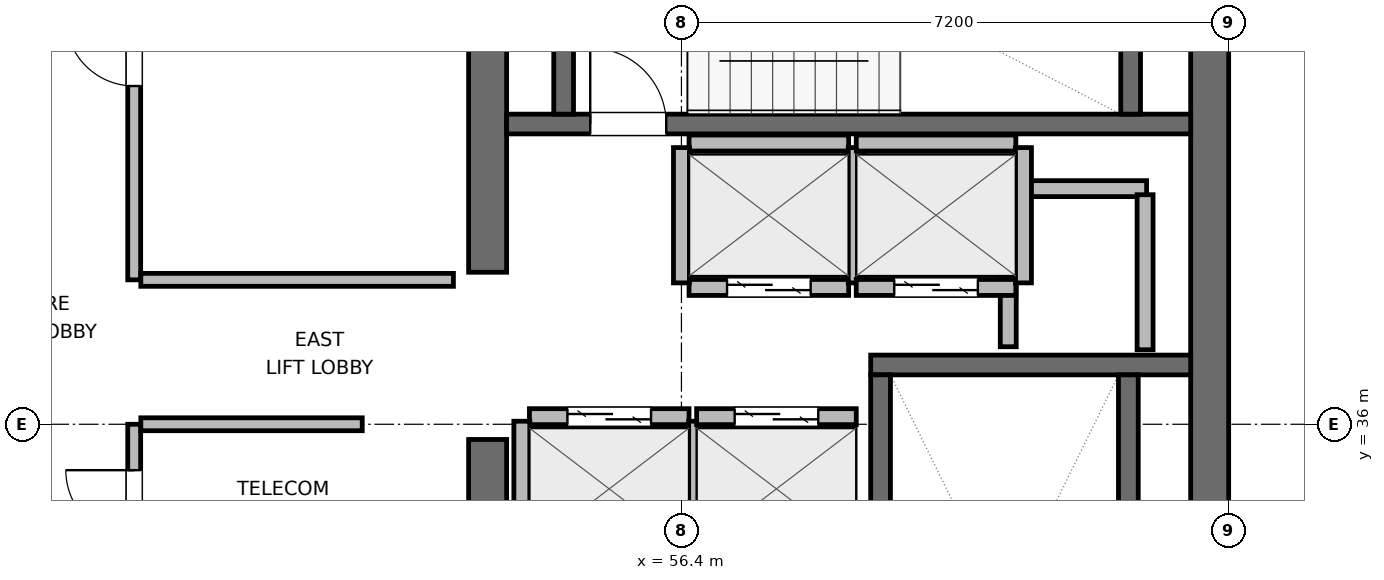
"""IFC4 building model, lengths in metres.
Left out: names, types, materials, properties, quantities, classifications, styles, units other than length and angle.
Written with IfcOpenShell. Run it as: python <this file> out.ifc"""

import sys

from ifc_helpers import new_model, si_unit, direction, frame, frame_2d, origin, place, context, subcontext, project, spatial, rectangle, extrude, element, fill, save


model = new_model("IFC4")
c1 = context("Model", 3, precision=1e-05, world=origin(), true_north=direction((0.0, 1.0)))
c2 = subcontext(c1, "Body", "Model", "MODEL_VIEW")
j1 = project(units=[si_unit("LENGTHUNIT", "METRE"), si_unit("PLANEANGLEUNIT", "RADIAN")], contexts=[c1])
p1 = place(None, origin())
s1 = spatial("IfcSite", under=j1, at=p1, CompositionType="ELEMENT")
p2 = place(p1, origin())
s2 = spatial("IfcBuilding", under=s1, at=p2, CompositionType="ELEMENT")
p3 = place(p2, frame((0.0, 0.0, 262.8)))
s3 = spatial("IfcBuildingStorey", under=s2, at=p3, CompositionType="ELEMENT", Elevation=262.8)
p4 = place(p3, frame((53.85, 27.85, 0.0), z_axis=(0.0, 0.0, 1.0), x_axis=(0.0, 1.0, 0.0)))
e1 = element("IfcWall", 1, at=p4, inside=s3, PredefinedType="SHEAR", context=c2, shape_type="SweptSolid", body=[
    extrude(rectangle(XDim=7.95, YDim=0.5, at=frame_2d((3.975, 0.0))), origin(), (0.0, 0.0, 1.0), 3.9),
])
p5 = place(p3, frame((53.85, 38.0, 0.0), z_axis=(0.0, 0.0, 1.0), x_axis=(0.0, 1.0, 0.0)))
e2 = element("IfcWall", 2, at=p5, inside=s3, PredefinedType="SHEAR", context=c2, shape_type="SweptSolid", body=[
    extrude(rectangle(XDim=6.15, YDim=0.5, at=frame_2d((3.075, 0.0))), origin(), (0.0, 0.0, 1.0), 3.9),
])
p6 = place(p3, frame((63.35, 27.6, 0.0), z_axis=(0.0, 0.0, 1.0), x_axis=(0.0, 1.0, 0.0)))
e3 = element("IfcWall", 3, at=p6, inside=s3, PredefinedType="SHEAR", context=c2, shape_type="SweptSolid", body=[
    extrude(rectangle(XDim=16.8, YDim=0.5, at=frame_2d((8.4, 0.0))), origin(), (0.0, 0.0, 1.0), 3.9),
])
p7 = place(p3, frame((58.89, 36.78, 0.0), z_axis=(0.0, 0.0, 1.0), x_axis=(1.0, 0.0, 0.0)))
e4 = element("IfcWall", 4, at=p7, inside=s3, PredefinedType="SHEAR", context=c2, shape_type="SweptSolid", body=[
    extrude(rectangle(XDim=4.21, YDim=0.26, at=frame_2d((2.105, 0.0))), origin(), (0.0, 0.0, 1.0), 3.9),
])
p8 = place(p3, frame((59.02, 29.05, 0.0), z_axis=(0.0, 0.0, 1.0), x_axis=(0.0, 1.0, 0.0)))
e5 = element("IfcWall", 5, at=p8, inside=s3, PredefinedType="SHEAR", context=c2, shape_type="SweptSolid", body=[
    extrude(rectangle(XDim=7.6, YDim=0.26, at=frame_2d((3.8, 0.0))), origin(), (0.0, 0.0, 1.0), 3.9),
])
p9 = place(p8, frame((0.3, 0.0, 0.0)))
e6 = element("IfcOpeningElement", 6, at=p9, cuts=e5, PredefinedType="OPENING", context=c2, shape_type="SweptSolid", body=[
    extrude(rectangle(XDim=1.0, YDim=2.04, at=frame_2d((0.5, 1.02))), frame((0.0, 0.14, 0.0), z_axis=(0.0, -1.0, 0.0), x_axis=(1.0, 0.0, 0.0)), (0.0, 0.0, 1.0), 0.28),
])
p10 = place(p3, frame((62.28, 29.05, 0.0), z_axis=(0.0, 0.0, 1.0), x_axis=(0.0, 1.0, 0.0)))
e7 = element("IfcWall", 7, at=p10, inside=s3, PredefinedType="SHEAR", context=c2, shape_type="SweptSolid", body=[
    extrude(rectangle(XDim=7.6, YDim=0.26, at=frame_2d((3.8, 0.0))), origin(), (0.0, 0.0, 1.0), 3.9),
])
p11 = place(p3, frame((54.1, 39.95, 0.0), z_axis=(0.0, 0.0, 1.0), x_axis=(1.0, 0.0, 0.0)))
e8 = element("IfcWall", 8, at=p11, inside=s3, PredefinedType="SHEAR", context=c2, shape_type="SweptSolid", body=[
    extrude(rectangle(XDim=9.0, YDim=0.26, at=frame_2d((4.5, 0.0))), origin(), (0.0, 0.0, 1.0), 3.9),
])
p12 = place(p11, frame((1.1, 0.0, 0.0)))
e9 = element("IfcOpeningElement", 9, at=p12, cuts=e8, PredefinedType="OPENING", context=c2, shape_type="SweptSolid", body=[
    extrude(rectangle(XDim=1.0, YDim=2.04, at=frame_2d((0.5, 1.02))), frame((0.0, 0.14, 0.0), z_axis=(0.0, -1.0, 0.0), x_axis=(1.0, 0.0, 0.0)), (0.0, 0.0, 1.0), 0.28),
])
for number, where, z_axis, x_axis in (
    (10, (54.85, 40.08, 0.0), (0.0, 0.0, 1.0), (0.0, 1.0, 0.0)),
    (11, (62.31, 40.08, 0.0), (0.0, 0.0, 1.0), (0.0, 1.0, 0.0)),
):
    element("IfcWall", number, at=place(p3, frame(where, z_axis=z_axis, x_axis=x_axis)), inside=s3, PredefinedType="SHEAR", context=c2, shape_type="SweptSolid", body=[
        extrude(rectangle(XDim=2.94, YDim=0.26, at=frame_2d((1.47, 0.0))), origin(), (0.0, 0.0, 1.0), 3.9),
    ])
p13 = place(p3, frame((60.72, 39.1, 0.0), z_axis=(0.0, 0.0, 1.0), x_axis=(1.0, 0.0, 0.0)))
e12 = element("IfcWall", 12, at=p13, inside=s3, PredefinedType="PARTITIONING", context=c2, shape_type="SweptSolid", body=[
    extrude(rectangle(XDim=1.8, YDim=0.21, at=frame_2d((0.9, 0.0))), origin(), (0.0, 0.0, 1.0), 3.68),
])
p14 = place(p3, frame((60.7, 37.02, 0.0), z_axis=(0.0, 0.0, 1.0), x_axis=(0.0, 1.0, 0.0)))
e13 = element("IfcWall", 13, at=p14, inside=s3, PredefinedType="PARTITIONING", context=c2, shape_type="SweptSolid", body=[
    extrude(rectangle(XDim=1.96, YDim=0.21, at=frame_2d((0.98, 0.0))), origin(), (0.0, 0.0, 1.0), 3.68),
])
p15 = place(p3, frame((62.5, 36.98, 0.0), z_axis=(0.0, 0.0, 1.0), x_axis=(0.0, 1.0, 0.0)))
e14 = element("IfcWall", 14, at=p15, inside=s3, PredefinedType="PARTITIONING", context=c2, shape_type="SweptSolid", body=[
    extrude(rectangle(XDim=2.04, YDim=0.21, at=frame_2d((1.02, 0.0))), origin(), (0.0, 0.0, 1.0), 3.68),
])
p16 = place(p3, frame((54.4, 36.1, 0.0), z_axis=(0.0, 0.0, 1.0), x_axis=(1.0, 0.0, 0.0)))
e15 = element("IfcWall", 15, at=p16, inside=s3, PredefinedType="PARTITIONING", context=c2, shape_type="SweptSolid", body=[
    extrude(rectangle(XDim=2.1, YDim=0.21, at=frame_2d((1.05, 0.0))), origin(), (0.0, 0.0, 1.0), 3.68),
])
p17 = place(p16, frame((0.5, 0.0, 0.0)))
e16 = element("IfcOpeningElement", 16, at=p17, cuts=e15, PredefinedType="OPENING", context=c2, shape_type="SweptSolid", body=[
    extrude(rectangle(XDim=1.1, YDim=2.04, at=frame_2d((0.55, 1.02))), frame((0.0, 0.115, 0.0), z_axis=(0.0, -1.0, 0.0), x_axis=(1.0, 0.0, 0.0)), (0.0, 0.0, 1.0), 0.23),
])
for number, where, z_axis, x_axis in (
    (17, (54.3, 34.26, 0.0), (0.0, 0.0, 1.0), (0.0, 1.0, 0.0)),
    (18, (56.6, 34.26, 0.0), (0.0, 0.0, 1.0), (0.0, 1.0, 0.0)),
):
    element("IfcWall", number, at=place(p3, frame(where, z_axis=z_axis, x_axis=x_axis)), inside=s3, PredefinedType="PARTITIONING", context=c2, shape_type="SweptSolid", body=[
        extrude(rectangle(XDim=1.78, YDim=0.21, at=frame_2d((0.89, 0.0))), origin(), (0.0, 0.0, 1.0), 3.68),
    ])
p18 = place(p3, frame((56.6, 36.1, 0.0), z_axis=(0.0, 0.0, 1.0), x_axis=(1.0, 0.0, 0.0)))
e19 = element("IfcWall", 19, at=p18, inside=s3, PredefinedType="PARTITIONING", context=c2, shape_type="SweptSolid", body=[
    extrude(rectangle(XDim=2.1, YDim=0.21, at=frame_2d((1.05, 0.0))), origin(), (0.0, 0.0, 1.0), 3.68),
])
p19 = place(p18, frame((0.5, 0.0, 0.0)))
e20 = element("IfcOpeningElement", 20, at=p19, cuts=e19, PredefinedType="OPENING", context=c2, shape_type="SweptSolid", body=[
    extrude(rectangle(XDim=1.1, YDim=2.04, at=frame_2d((0.55, 1.02))), frame((0.0, 0.115, 0.0), z_axis=(0.0, -1.0, 0.0), x_axis=(1.0, 0.0, 0.0)), (0.0, 0.0, 1.0), 0.23),
])
p20 = place(p3, frame((56.5, 37.8, 0.0), z_axis=(0.0, 0.0, 1.0), x_axis=(1.0, 0.0, 0.0)))
e21 = element("IfcWall", 21, at=p20, inside=s3, PredefinedType="PARTITIONING", context=c2, shape_type="SweptSolid", body=[
    extrude(rectangle(XDim=2.1, YDim=0.21, at=frame_2d((1.05, 0.0))), origin(), (0.0, 0.0, 1.0), 3.68),
])
p21 = place(p20, frame((0.5, 0.0, 0.0)))
e22 = element("IfcOpeningElement", 22, at=p21, cuts=e21, PredefinedType="OPENING", context=c2, shape_type="SweptSolid", body=[
    extrude(rectangle(XDim=1.1, YDim=2.04, at=frame_2d((0.55, 1.02))), frame((0.0, 0.115, 0.0), z_axis=(0.0, -1.0, 0.0), x_axis=(1.0, 0.0, 0.0)), (0.0, 0.0, 1.0), 0.23),
])
p22 = place(p3, frame((56.5, 39.7, 0.0), z_axis=(0.0, 0.0, 1.0), x_axis=(1.0, 0.0, 0.0)))
e23 = element("IfcWall", 23, at=p22, inside=s3, PredefinedType="PARTITIONING", context=c2, shape_type="SweptSolid", body=[
    extrude(rectangle(XDim=2.1, YDim=0.21, at=frame_2d((1.05, 0.0))), origin(), (0.0, 0.0, 1.0), 3.68),
])
for number, where, z_axis, x_axis in (
    (24, (56.4, 37.86, 0.0), (0.0, 0.0, 1.0), (0.0, 1.0, 0.0)),
    (25, (58.7, 37.86, 0.0), (0.0, 0.0, 1.0), (0.0, 1.0, 0.0)),
):
    element("IfcWall", number, at=place(p3, frame(where, z_axis=z_axis, x_axis=x_axis)), inside=s3, PredefinedType="PARTITIONING", context=c2, shape_type="SweptSolid", body=[
        extrude(rectangle(XDim=1.78, YDim=0.21, at=frame_2d((0.89, 0.0))), origin(), (0.0, 0.0, 1.0), 3.68),
    ])
p23 = place(p3, frame((58.7, 37.8, 0.0), z_axis=(0.0, 0.0, 1.0), x_axis=(1.0, 0.0, 0.0)))
e26 = element("IfcWall", 26, at=p23, inside=s3, PredefinedType="PARTITIONING", context=c2, shape_type="SweptSolid", body=[
    extrude(rectangle(XDim=2.1, YDim=0.21, at=frame_2d((1.05, 0.0))), origin(), (0.0, 0.0, 1.0), 3.68),
])
p24 = place(p23, frame((0.5, 0.0, 0.0)))
e27 = element("IfcOpeningElement", 27, at=p24, cuts=e26, PredefinedType="OPENING", context=c2, shape_type="SweptSolid", body=[
    extrude(rectangle(XDim=1.1, YDim=2.04, at=frame_2d((0.55, 1.02))), frame((0.0, 0.115, 0.0), z_axis=(0.0, -1.0, 0.0), x_axis=(1.0, 0.0, 0.0)), (0.0, 0.0, 1.0), 0.23),
])
p25 = place(p3, frame((58.7, 39.7, 0.0), z_axis=(0.0, 0.0, 1.0), x_axis=(1.0, 0.0, 0.0)))
e28 = element("IfcWall", 28, at=p25, inside=s3, PredefinedType="PARTITIONING", context=c2, shape_type="SweptSolid", body=[
    extrude(rectangle(XDim=2.1, YDim=0.21, at=frame_2d((1.05, 0.0))), origin(), (0.0, 0.0, 1.0), 3.68),
])
p26 = place(p3, frame((60.9, 37.86, 0.0), z_axis=(0.0, 0.0, 1.0), x_axis=(0.0, 1.0, 0.0)))
e29 = element("IfcWall", 29, at=p26, inside=s3, PredefinedType="PARTITIONING", context=c2, shape_type="SweptSolid", body=[
    extrude(rectangle(XDim=1.78, YDim=0.21, at=frame_2d((0.89, 0.0))), origin(), (0.0, 0.0, 1.0), 3.68),
])
p27 = place(p3, frame((49.2, 32.6, 0.0), z_axis=(0.0, 0.0, 1.0), x_axis=(0.0, 1.0, 0.0)))
e30 = element("IfcWall", 30, at=p27, inside=s3, PredefinedType="PARTITIONING", context=c2, shape_type="SweptSolid", body=[
    extrude(rectangle(XDim=3.4, YDim=0.17, at=frame_2d((1.7, 0.0))), origin(), (0.0, 0.0, 1.0), 3.68),
])
p28 = place(p27, frame((0.196, 0.0, 0.0)))
e31 = element("IfcOpeningElement", 31, at=p28, cuts=e30, PredefinedType="OPENING", context=c2, shape_type="SweptSolid", body=[
    extrude(rectangle(XDim=0.9, YDim=2.02, at=frame_2d((0.45, 1.01))), frame((0.0, 0.095, 0.0), z_axis=(0.0, -1.0, 0.0), x_axis=(1.0, 0.0, 0.0)), (0.0, 0.0, 1.0), 0.19),
])
p29 = place(p27, frame((1.896, 0.0, 0.0)))
e32 = element("IfcOpeningElement", 32, at=p29, cuts=e30, PredefinedType="OPENING", context=c2, shape_type="SweptSolid", body=[
    extrude(rectangle(XDim=0.9, YDim=2.02, at=frame_2d((0.45, 1.01))), frame((0.0, 0.095, 0.0), z_axis=(0.0, -1.0, 0.0), x_axis=(1.0, 0.0, 0.0)), (0.0, 0.0, 1.0), 0.19),
])
p30 = place(p3, frame((49.287, 36.0, 0.0), z_axis=(0.0, 0.0, 1.0), x_axis=(1.0, 0.0, 0.0)))
e33 = element("IfcWall", 33, at=p30, inside=s3, PredefinedType="PARTITIONING", context=c2, shape_type="SweptSolid", body=[
    extrude(rectangle(XDim=2.913, YDim=0.17, at=frame_2d((1.457, 0.0))), origin(), (0.0, 0.0, 1.0), 3.68),
])
p31 = place(p3, frame((49.2, 37.9, 0.0), z_axis=(0.0, 0.0, 1.0), x_axis=(0.0, 1.0, 0.0)))
e34 = element("IfcWall", 34, at=p31, inside=s3, PredefinedType="PARTITIONING", context=c2, shape_type="SweptSolid", body=[
    extrude(rectangle(XDim=6.0, YDim=0.17, at=frame_2d((3.0, 0.0))), origin(), (0.0, 0.0, 1.0), 3.68),
])
p32 = place(p31, frame((2.55, 0.0, 0.0)))
e35 = element("IfcOpeningElement", 35, at=p32, cuts=e34, PredefinedType="OPENING", context=c2, shape_type="SweptSolid", body=[
    extrude(rectangle(XDim=0.9, YDim=2.02, at=frame_2d((0.45, 1.01))), frame((0.0, 0.095, 0.0), z_axis=(0.0, -1.0, 0.0), x_axis=(1.0, 0.0, 0.0)), (0.0, 0.0, 1.0), 0.19),
])
p33 = place(p3, frame((49.287, 37.9, 0.0), z_axis=(0.0, 0.0, 1.0), x_axis=(1.0, 0.0, 0.0)))
e36 = element("IfcWall", 36, at=p33, inside=s3, PredefinedType="PARTITIONING", context=c2, shape_type="SweptSolid", body=[
    extrude(rectangle(XDim=4.113, YDim=0.17, at=frame_2d((2.056, 0.0))), origin(), (0.0, 0.0, 1.0), 3.68),
])
p34 = place(p12, origin())
e37 = element("IfcDoor", 37, at=p34, inside=s3, OperationType="SINGLE_SWING_LEFT", PredefinedType="DOOR", context=c2, shape_type="SweptSolid", body=[
    extrude(rectangle(XDim=1.0, YDim=2.04, at=frame_2d((0.5, 1.02))), frame((0.0, 0.025, 0.0), z_axis=(0.0, -1.0, 0.0), x_axis=(1.0, 0.0, 0.0)), (0.0, 0.0, 1.0), 0.05),
])
fill(e9, e37)
p35 = place(p17, origin())
e38 = element("IfcDoor", 38, at=p35, inside=s3, OperationType="DOUBLE_DOOR_SLIDING", PredefinedType="DOOR", context=c2, shape_type="SweptSolid", body=[
    extrude(rectangle(XDim=1.1, YDim=2.04, at=frame_2d((0.55, 1.02))), frame((0.0, 0.025, 0.0), z_axis=(0.0, -1.0, 0.0), x_axis=(1.0, 0.0, 0.0)), (0.0, 0.0, 1.0), 0.05),
])
fill(e16, e38)
p36 = place(p19, origin())
e39 = element("IfcDoor", 39, at=p36, inside=s3, OperationType="DOUBLE_DOOR_SLIDING", PredefinedType="DOOR", context=c2, shape_type="SweptSolid", body=[
    extrude(rectangle(XDim=1.1, YDim=2.04, at=frame_2d((0.55, 1.02))), frame((0.0, 0.025, 0.0), z_axis=(0.0, -1.0, 0.0), x_axis=(1.0, 0.0, 0.0)), (0.0, 0.0, 1.0), 0.05),
])
fill(e20, e39)
p37 = place(p21, origin())
e40 = element("IfcDoor", 40, at=p37, inside=s3, OperationType="DOUBLE_DOOR_SLIDING", PredefinedType="DOOR", context=c2, shape_type="SweptSolid", body=[
    extrude(rectangle(XDim=1.1, YDim=2.04, at=frame_2d((0.55, 1.02))), frame((0.0, 0.025, 0.0), z_axis=(0.0, -1.0, 0.0), x_axis=(1.0, 0.0, 0.0)), (0.0, 0.0, 1.0), 0.05),
])
fill(e22, e40)
p38 = place(p24, origin())
e41 = element("IfcDoor", 41, at=p38, inside=s3, OperationType="DOUBLE_DOOR_SLIDING", PredefinedType="DOOR", context=c2, shape_type="SweptSolid", body=[
    extrude(rectangle(XDim=1.1, YDim=2.04, at=frame_2d((0.55, 1.02))), frame((0.0, 0.025, 0.0), z_axis=(0.0, -1.0, 0.0), x_axis=(1.0, 0.0, 0.0)), (0.0, 0.0, 1.0), 0.05),
])
fill(e27, e41)
p39 = place(p29, origin())
e42 = element("IfcDoor", 42, at=p39, inside=s3, OperationType="SINGLE_SWING_RIGHT", PredefinedType="DOOR", context=c2, shape_type="SweptSolid", body=[
    extrude(rectangle(XDim=0.9, YDim=2.02, at=frame_2d((0.45, 1.01))), frame((0.0, 0.025, 0.0), z_axis=(0.0, -1.0, 0.0), x_axis=(1.0, 0.0, 0.0)), (0.0, 0.0, 1.0), 0.05),
])
fill(e32, e42)
p40 = place(p32, origin())
e43 = element("IfcDoor", 43, at=p40, inside=s3, OperationType="SINGLE_SWING_RIGHT", PredefinedType="DOOR", context=c2, shape_type="SweptSolid", body=[
    extrude(rectangle(XDim=0.9, YDim=2.02, at=frame_2d((0.45, 1.01))), frame((0.0, 0.025, 0.0), z_axis=(0.0, -1.0, 0.0), x_axis=(1.0, 0.0, 0.0)), (0.0, 0.0, 1.0), 0.05),
])
fill(e35, e43)
save(model, sys.argv[1])
